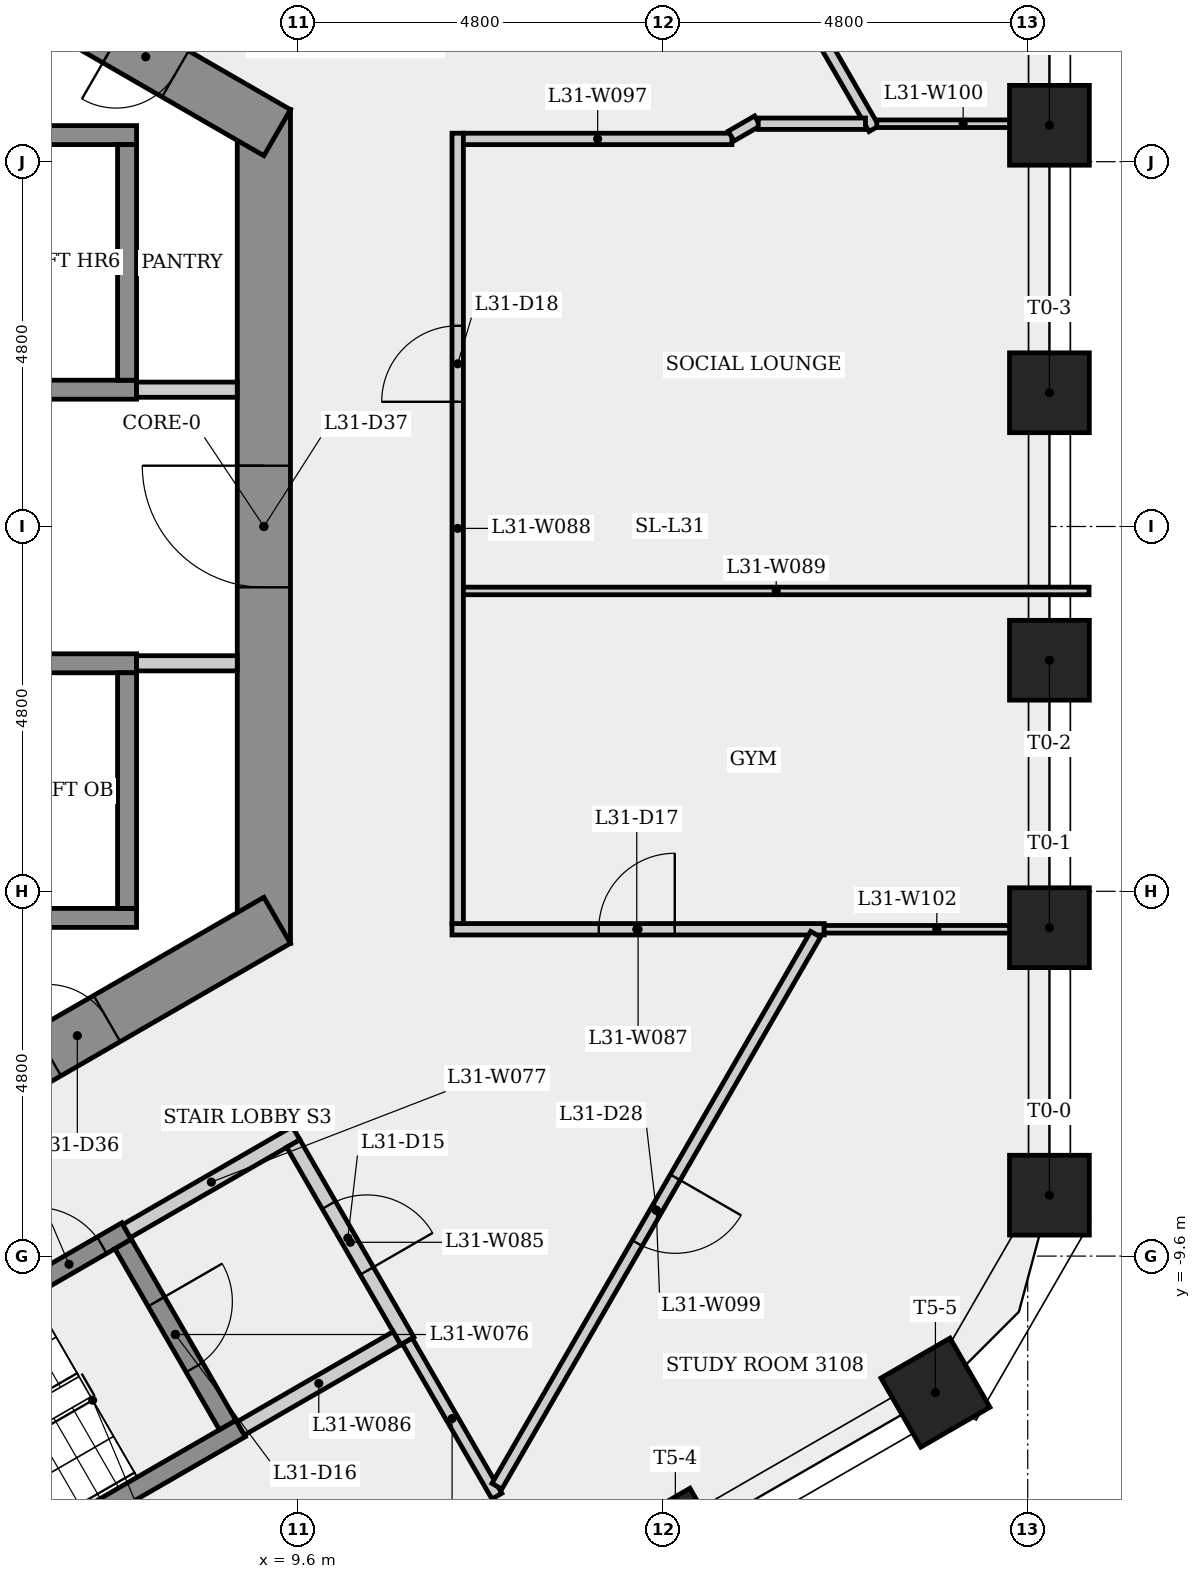
"""IFC4 building model, lengths in metres.
Left out: names, types, materials, properties, quantities, classifications, styles, units other than length and angle.
Written with IfcOpenShell. Run it as: python <this file> out.ifc"""

import sys

from ifc_helpers import new_model, si_unit, direction, frame, frame_2d, origin, origin_2d, place, context, subcontext, project, spatial, rectangle, extrude, element, fill, save


model = new_model("IFC4")
c1 = context("Model", 3, precision=1e-05, world=origin(), true_north=direction((0.0, 1.0)))
c2 = subcontext(c1, "Body", "Model", "MODEL_VIEW")
j1 = project(units=[si_unit("LENGTHUNIT", "METRE"), si_unit("PLANEANGLEUNIT", "RADIAN")], contexts=[c1])
p1 = place(None, origin())
s1 = spatial("IfcSite", under=j1, at=p1, CompositionType="ELEMENT")
p2 = place(p1, origin())
s2 = spatial("IfcBuilding", under=s1, at=p2, CompositionType="ELEMENT")
p3 = place(p2, frame((0.0, 0.0, 117.1)))
s3 = spatial("IfcBuildingStorey", under=s2, at=p3, CompositionType="ELEMENT", Elevation=117.1)
p4 = place(p3, frame((9.15, -5.485, 0.0), z_axis=(0.0, 0.0, 1.0), x_axis=(0.0, 1.0, 0.0)))
e1 = element("IfcWall", 1, at=p4, inside=s3, PredefinedType="SHEAR", context=c2, shape_type="SweptSolid", body=[
    extrude(rectangle(XDim=10.97, YDim=0.7, at=frame_2d((5.485, 0.0))), origin(), (0.0, 0.0, 1.0), 3.4),
])
p5 = place(p4, frame((4.685, 0.0, 0.0)))
e2 = element("IfcOpeningElement", 2, at=p5, cuts=e1, PredefinedType="OPENING", context=c2, shape_type="SweptSolid", body=[
    extrude(rectangle(XDim=1.6, YDim=2.1, at=frame_2d((0.8, 1.05))), frame((0.0, 0.36, 0.0), z_axis=(0.0, -1.0, 0.0), x_axis=(1.0, 0.0, 0.0)), (0.0, 0.0, 1.0), 0.72),
])
p6 = place(p3, frame((9.325, 5.182, 0.0), z_axis=(0.0, 0.0, 1.0), x_axis=(-0.866023993627, 0.500002442456, 0.0)))
e3 = element("IfcWall", 3, at=p6, inside=s3, PredefinedType="SHEAR", context=c2, shape_type="SweptSolid", body=[
    extrude(rectangle(XDim=10.97, YDim=0.7, at=frame_2d((5.485, 0.0))), origin(), (0.0, 0.0, 1.0), 3.4),
])
p7 = place(p6, frame((8.267, 0.0, 0.0)))
e4 = element("IfcOpeningElement", 4, at=p7, cuts=e3, PredefinedType="OPENING", context=c2, shape_type="SweptSolid", body=[
    extrude(rectangle(XDim=0.9, YDim=2.1, at=frame_2d((0.45, 1.05))), frame((0.0, 0.36, 0.0), z_axis=(0.0, -1.0, 0.0), x_axis=(1.0, 0.0, 0.0)), (0.0, 0.0, 1.0), 0.72),
])
p8 = place(p6, frame((1.547, 0.0, 0.0)))
e5 = element("IfcOpeningElement", 5, at=p8, cuts=e3, PredefinedType="OPENING", context=c2, shape_type="SweptSolid", body=[
    extrude(rectangle(XDim=0.9, YDim=2.1, at=frame_2d((0.45, 1.05))), frame((0.0, 0.36, 0.0), z_axis=(0.0, -1.0, 0.0), x_axis=(1.0, 0.0, 0.0)), (0.0, 0.0, 1.0), 0.72),
])
p9 = place(p3, frame((-0.175, -10.667, 0.0), z_axis=(0.0, 0.0, 1.0), x_axis=(0.866023993627, 0.500002442456, 0.0)))
e6 = element("IfcWall", 6, at=p9, inside=s3, PredefinedType="SHEAR", context=c2, shape_type="SweptSolid", body=[
    extrude(rectangle(XDim=10.97, YDim=0.7, at=frame_2d((5.485, 0.0))), origin(), (0.0, 0.0, 1.0), 3.4),
])
p10 = place(p9, frame((0.9, 0.0, 0.0)))
e7 = element("IfcOpeningElement", 7, at=p10, cuts=e6, PredefinedType="OPENING", context=c2, shape_type="SweptSolid", body=[
    extrude(rectangle(XDim=0.9, YDim=2.1, at=frame_2d((0.45, 1.05))), frame((0.0, 0.36, 0.0), z_axis=(0.0, -1.0, 0.0), x_axis=(1.0, 0.0, 0.0)), (0.0, 0.0, 1.0), 0.72),
])
p11 = place(p9, frame((7.483, 0.0, 0.0)))
e8 = element("IfcOpeningElement", 8, at=p11, cuts=e6, PredefinedType="OPENING", context=c2, shape_type="SweptSolid", body=[
    extrude(rectangle(XDim=0.9, YDim=2.1, at=frame_2d((0.45, 1.05))), frame((0.0, 0.36, 0.0), z_axis=(0.0, -1.0, 0.0), x_axis=(1.0, 0.0, 0.0)), (0.0, 0.0, 1.0), 0.72),
])
for number, where, z_axis, x_axis in (
    (9, (19.486, -8.798, 0.0), (0.0, 0.0, 1.0), (1.0, 0.0, 0.0)),
    (10, (19.486, -5.279, 0.0), (0.0, 0.0, 1.0), (1.0, 0.0, 0.0)),
    (11, (19.486, -1.76, 0.0), (0.0, 0.0, 1.0), (1.0, 0.0, 0.0)),
    (12, (19.486, 1.76, 0.0), (0.0, 0.0, 1.0), (1.0, 0.0, 0.0)),
    (13, (19.486, 5.279, 0.0), (0.0, 0.0, 1.0), (1.0, 0.0, 0.0)),
    (14, (14.564, -13.372, 0.0), (0.0, 0.0, 1.0), (0.5, -0.866, 0.0)),
    (15, (17.986, -11.396, 0.0), (0.0, 0.0, 1.0), (0.5, -0.866, 0.0)),
):
    element("IfcColumn", number, at=place(p3, frame(where, z_axis=z_axis, x_axis=x_axis)), inside=s3, PredefinedType="COLUMN", context=c2, shape_type="SweptSolid", body=[
        extrude(rectangle(XDim=1.05, YDim=1.05, at=origin_2d()), origin(), (0.0, 0.0, 1.0), 3.4),
    ])
p12 = place(p3, frame((-7.475, 1.8, 0.0), z_axis=(0.0, 0.0, 1.0), x_axis=(1.0, 0.0, 0.0)))
e16 = element("IfcWall", 16, at=p12, inside=s3, PredefinedType="SHEAR", context=c2, shape_type="SweptSolid", body=[
    extrude(rectangle(XDim=14.95, YDim=0.25, at=frame_2d((7.475, 0.0))), origin(), (0.0, 0.0, 1.0), 3.0),
])
for number, where, z_axis, x_axis in (
    (17, (-7.225, 5.15, 0.0), (0.0, 0.0, 1.0), (1.0, 0.0, 0.0)),
    (18, (-7.225, -5.15, 0.0), (0.0, 0.0, 1.0), (1.0, 0.0, 0.0)),
):
    element("IfcWall", number, at=place(p3, frame(where, z_axis=z_axis, x_axis=x_axis)), inside=s3, PredefinedType="SHEAR", context=c2, shape_type="SweptSolid", body=[
        extrude(rectangle(XDim=14.7, YDim=0.25, at=frame_2d((7.35, 0.0))), origin(), (0.0, 0.0, 1.0), 3.0),
    ])
p13 = place(p3, frame((-7.225, -1.8, 0.0), z_axis=(0.0, 0.0, 1.0), x_axis=(1.0, 0.0, 0.0)))
e19 = element("IfcWall", 19, at=p13, inside=s3, PredefinedType="SHEAR", context=c2, shape_type="SweptSolid", body=[
    extrude(rectangle(XDim=14.7, YDim=0.25, at=frame_2d((7.35, 0.0))), origin(), (0.0, 0.0, 1.0), 3.0),
])
p14 = place(p13, frame((0.597, 0.0, 0.0)))
e20 = element("IfcOpeningElement", 20, at=p14, cuts=e19, PredefinedType="OPENING", context=c2, shape_type="SweptSolid", body=[
    extrude(rectangle(XDim=1.1, YDim=2.1, at=frame_2d((0.55, 1.05))), frame((0.0, 0.135, 0.0), z_axis=(0.0, -1.0, 0.0), x_axis=(1.0, 0.0, 0.0)), (0.0, 0.0, 1.0), 0.27),
])
p15 = place(p13, frame((3.0, 0.0, 0.0)))
e21 = element("IfcOpeningElement", 21, at=p15, cuts=e19, PredefinedType="OPENING", context=c2, shape_type="SweptSolid", body=[
    extrude(rectangle(XDim=1.1, YDim=2.1, at=frame_2d((0.55, 1.05))), frame((0.0, 0.135, 0.0), z_axis=(0.0, -1.0, 0.0), x_axis=(1.0, 0.0, 0.0)), (0.0, 0.0, 1.0), 0.27),
])
p16 = place(p13, frame((5.45, 0.0, 0.0)))
e22 = element("IfcOpeningElement", 22, at=p16, cuts=e19, PredefinedType="OPENING", context=c2, shape_type="SweptSolid", body=[
    extrude(rectangle(XDim=1.1, YDim=2.1, at=frame_2d((0.55, 1.05))), frame((0.0, 0.135, 0.0), z_axis=(0.0, -1.0, 0.0), x_axis=(1.0, 0.0, 0.0)), (0.0, 0.0, 1.0), 0.27),
])
p17 = place(p13, frame((7.9, 0.0, 0.0)))
e23 = element("IfcOpeningElement", 23, at=p17, cuts=e19, PredefinedType="OPENING", context=c2, shape_type="SweptSolid", body=[
    extrude(rectangle(XDim=1.1, YDim=2.1, at=frame_2d((0.55, 1.05))), frame((0.0, 0.135, 0.0), z_axis=(0.0, -1.0, 0.0), x_axis=(1.0, 0.0, 0.0)), (0.0, 0.0, 1.0), 0.27),
])
p18 = place(p13, frame((10.35, 0.0, 0.0)))
e24 = element("IfcOpeningElement", 24, at=p18, cuts=e19, PredefinedType="OPENING", context=c2, shape_type="SweptSolid", body=[
    extrude(rectangle(XDim=1.1, YDim=2.1, at=frame_2d((0.55, 1.05))), frame((0.0, 0.135, 0.0), z_axis=(0.0, -1.0, 0.0), x_axis=(1.0, 0.0, 0.0)), (0.0, 0.0, 1.0), 0.27),
])
p19 = place(p3, frame((1.585, -12.595, 0.0), z_axis=(0.0, 0.0, 1.0), x_axis=(0.866036417653, 0.499980922934, 0.0)))
e25 = element("IfcWall", 25, at=p19, inside=s3, PredefinedType="SHEAR", context=c2, shape_type="SweptSolid", body=[
    extrude(rectangle(XDim=6.65, YDim=0.25, at=frame_2d((3.325, 0.0))), origin(), (0.0, 0.0, 1.0), 3.0),
])
p20 = place(p19, frame((5.275, 0.0, 0.0)))
e26 = element("IfcOpeningElement", 26, at=p20, cuts=e25, PredefinedType="OPENING", context=c2, shape_type="SweptSolid", body=[
    extrude(rectangle(XDim=1.0, YDim=2.1, at=frame_2d((0.5, 1.05))), frame((0.0, 0.135, 0.0), z_axis=(0.0, -1.0, 0.0), x_axis=(1.0, 0.0, 0.0)), (0.0, 0.0, 1.0), 0.27),
])
p21 = place(p3, frame((3.301, -15.068, 0.0), z_axis=(0.0, 0.0, 1.0), x_axis=(0.866035036182, 0.499983315828, 0.0)))
e27 = element("IfcWall", 27, at=p21, inside=s3, PredefinedType="SHEAR", context=c2, shape_type="SweptSolid", body=[
    extrude(rectangle(XDim=6.4, YDim=0.25, at=frame_2d((3.2, 0.0))), origin(), (0.0, 0.0, 1.0), 3.0),
])
p22 = place(p3, frame((7.298, -9.441, 0.0), z_axis=(0.0, 0.0, 1.0), x_axis=(0.500034990121, -0.866005201286, 0.0)))
e28 = element("IfcWall", 28, at=p22, inside=s3, PredefinedType="SHEAR", context=c2, shape_type="SweptSolid", body=[
    extrude(rectangle(XDim=2.75, YDim=0.25, at=frame_2d((1.375, 0.0))), origin(), (0.0, 0.0, 1.0), 3.0),
])
p23 = place(p22, frame((0.875, 0.0, 0.0)))
e29 = element("IfcOpeningElement", 29, at=p23, cuts=e28, PredefinedType="OPENING", context=c2, shape_type="SweptSolid", body=[
    extrude(rectangle(XDim=1.0, YDim=2.1, at=frame_2d((0.5, 1.05))), frame((0.0, 0.135, 0.0), z_axis=(0.0, -1.0, 0.0), x_axis=(1.0, 0.0, 0.0)), (0.0, 0.0, 1.0), 0.27),
])
p24 = place(p3, frame((7.344, -9.27, 0.0), z_axis=(0.0, 0.0, 1.0), x_axis=(0.866005588531, 0.500034319456, 0.0)))
e30 = element("IfcWall", 30, at=p24, inside=s3, PredefinedType="PARTITIONING", context=c2, shape_type="SweptSolid", body=[
    extrude(rectangle(XDim=2.575, YDim=0.2, at=frame_2d((1.288, 0.0))), origin(), (0.0, 0.0, 1.0), 3.0),
])
p25 = place(p3, frame((7.475, 1.8, 0.0), z_axis=(0.0, 0.0, 1.0), x_axis=(1.0, 0.0, 0.0)))
e31 = element("IfcWall", 31, at=p25, inside=s3, PredefinedType="PARTITIONING", context=c2, shape_type="SweptSolid", body=[
    extrude(rectangle(XDim=1.325, YDim=0.2, at=frame_2d((0.663, 0.0))), origin(), (0.0, 0.0, 1.0), 3.0),
])
for number, where, z_axis, x_axis in (
    (32, (7.35, -1.925, 0.0), (0.0, 0.0, 1.0), (0.0, -1.0, 0.0)),
    (33, (7.35, 5.025, 0.0), (0.0, 0.0, 1.0), (0.0, -1.0, 0.0)),
):
    element("IfcWall", number, at=place(p3, frame(where, z_axis=z_axis, x_axis=x_axis)), inside=s3, PredefinedType="SHEAR", context=c2, shape_type="SweptSolid", body=[
        extrude(rectangle(XDim=3.1, YDim=0.25, at=frame_2d((1.55, 0.0))), origin(), (0.0, 0.0, 1.0), 3.4),
    ])
p26 = place(p3, frame((8.8, -1.8, 0.0), z_axis=(0.0, 0.0, 1.0), x_axis=(-1.0, 0.0, 0.0)))
e34 = element("IfcWall", 34, at=p26, inside=s3, PredefinedType="PARTITIONING", context=c2, shape_type="SweptSolid", body=[
    extrude(rectangle(XDim=1.325, YDim=0.2, at=frame_2d((0.663, 0.0))), origin(), (0.0, 0.0, 1.0), 3.0),
])
p27 = place(p3, frame((9.537, -8.119, 0.0), z_axis=(0.0, 0.0, 1.0), x_axis=(0.499990139034, -0.866031096941, 0.0)))
e35 = element("IfcWall", 35, at=p27, inside=s3, PredefinedType="PARTITIONING", context=c2, shape_type="SweptSolid", body=[
    extrude(rectangle(XDim=3.0, YDim=0.2, at=frame_2d((1.5, 0.0))), origin(), (0.0, 0.0, 1.0), 3.0),
])
p28 = place(p27, frame((0.935, 0.0, 0.0)))
e36 = element("IfcOpeningElement", 36, at=p28, cuts=e35, PredefinedType="OPENING", context=c2, shape_type="SweptSolid", body=[
    extrude(rectangle(XDim=1.0, YDim=2.1, at=frame_2d((0.5, 1.05))), frame((0.0, 0.11, 0.0), z_axis=(0.0, -1.0, 0.0), x_axis=(1.0, 0.0, 0.0)), (0.0, 0.0, 1.0), 0.22),
])
p29 = place(p3, frame((10.901, -10.681, 0.0), z_axis=(0.0, 0.0, 1.0), x_axis=(-0.866007538022, -0.500030943131, 0.0)))
e37 = element("IfcWall", 37, at=p29, inside=s3, PredefinedType="PARTITIONING", context=c2, shape_type="SweptSolid", body=[
    extrude(rectangle(XDim=2.375, YDim=0.2, at=frame_2d((1.188, 0.0))), origin(), (0.0, 0.0, 1.0), 3.0),
])
p30 = place(p3, frame((11.625, -5.3, 0.0), z_axis=(0.0, 0.0, 1.0), x_axis=(1.0, 0.0, 0.0)))
e38 = element("IfcWall", 38, at=p30, inside=s3, PredefinedType="PARTITIONING", context=c2, shape_type="SweptSolid", body=[
    extrude(rectangle(XDim=4.897, YDim=0.15, at=frame_2d((2.448, 0.0))), origin(), (0.0, 0.0, 1.0), 3.0),
])
p31 = place(p30, frame((1.931, 0.0, 0.0)))
e39 = element("IfcOpeningElement", 39, at=p31, cuts=e38, PredefinedType="OPENING", context=c2, shape_type="SweptSolid", body=[
    extrude(rectangle(XDim=1.0, YDim=2.1, at=frame_2d((0.5, 1.05))), frame((0.0, 0.085, 0.0), z_axis=(0.0, -1.0, 0.0), x_axis=(1.0, 0.0, 0.0)), (0.0, 0.0, 1.0), 0.17),
])
p32 = place(p3, frame((11.7, -5.225, 0.0), z_axis=(0.0, 0.0, 1.0), x_axis=(0.0, 1.0, 0.0)))
e40 = element("IfcWall", 40, at=p32, inside=s3, PredefinedType="PARTITIONING", context=c2, shape_type="SweptSolid", body=[
    extrude(rectangle(XDim=10.399, YDim=0.15, at=frame_2d((5.2, 0.0))), origin(), (0.0, 0.0, 1.0), 3.0),
])
p33 = place(p32, frame((6.865, 0.0, 0.0)))
e41 = element("IfcOpeningElement", 41, at=p33, cuts=e40, PredefinedType="OPENING", context=c2, shape_type="SweptSolid", body=[
    extrude(rectangle(XDim=1.0, YDim=2.1, at=frame_2d((0.5, 1.05))), frame((0.0, 0.085, 0.0), z_axis=(0.0, -1.0, 0.0), x_axis=(1.0, 0.0, 0.0)), (0.0, 0.0, 1.0), 0.17),
])
p34 = place(p3, frame((11.775, -0.848, 0.0), z_axis=(0.0, 0.0, 1.0), x_axis=(1.0, 0.0, 0.0)))
e42 = element("IfcWall", 42, at=p34, inside=s3, PredefinedType="PARTITIONING", context=c2, shape_type="SweptSolid", body=[
    extrude(rectangle(XDim=8.232, YDim=0.1, at=frame_2d((4.116, 0.0))), origin(), (0.0, 0.0, 1.0), 3.0),
])
p35 = place(p3, frame((12.216, -12.758, 0.0), z_axis=(0.0, 0.0, 1.0), x_axis=(-0.499982474044, 0.866035522163, 0.0)))
e43 = element("IfcWall", 43, at=p35, inside=s3, PredefinedType="PARTITIONING", context=c2, shape_type="SweptSolid", body=[
    extrude(rectangle(XDim=2.357, YDim=0.15, at=frame_2d((1.178, 0.0))), origin(), (0.0, 0.0, 1.0), 3.0),
])
p36 = place(p3, frame((14.294, 10.228, 0.0), z_axis=(0.0, 0.0, 1.0), x_axis=(0.499996112969, -0.866027647951, 0.0)))
e44 = element("IfcWall", 44, at=p36, inside=s3, PredefinedType="PARTITIONING", context=c2, shape_type="SweptSolid", body=[
    extrude(rectangle(XDim=5.766, YDim=0.15, at=frame_2d((2.883, 0.0))), origin(), (0.0, 0.0, 1.0), 3.0),
])
p37 = place(p36, frame((2.328, 0.0, 0.0)))
e45 = element("IfcOpeningElement", 45, at=p37, cuts=e44, PredefinedType="OPENING", context=c2, shape_type="SweptSolid", body=[
    extrude(rectangle(XDim=1.0, YDim=2.1, at=frame_2d((0.5, 1.05))), frame((0.0, 0.085, 0.0), z_axis=(0.0, -1.0, 0.0), x_axis=(1.0, 0.0, 0.0)), (0.0, 0.0, 1.0), 0.17),
])
p38 = place(p3, frame((15.308, 5.1, 0.0), z_axis=(0.0, 0.0, 1.0), x_axis=(-1.0, 0.0, 0.0)))
e46 = element("IfcWall", 46, at=p38, inside=s3, PredefinedType="PARTITIONING", context=c2, shape_type="SweptSolid", body=[
    extrude(rectangle(XDim=3.533, YDim=0.15, at=frame_2d((1.767, 0.0))), origin(), (0.0, 0.0, 1.0), 3.0),
])
p39 = place(p3, frame((15.644, 5.337, 0.0), z_axis=(0.0, 0.0, 1.0), x_axis=(-0.866094119867, -0.499880961361, 0.0)))
e47 = element("IfcWall", 47, at=p39, inside=s3, PredefinedType="PARTITIONING", context=c2, shape_type="SweptSolid", body=[
    extrude(rectangle(XDim=0.4, YDim=0.15, at=frame_2d((0.2, 0.0))), origin(), (0.0, 0.0, 1.0), 3.0),
])
p40 = place(p3, frame((16.409, -5.365, 0.0), z_axis=(0.0, 0.0, 1.0), x_axis=(-0.499980296409, -0.866036779359, 0.0)))
e48 = element("IfcWall", 48, at=p40, inside=s3, PredefinedType="PARTITIONING", context=c2, shape_type="SweptSolid", body=[
    extrude(rectangle(XDim=8.387, YDim=0.15, at=frame_2d((4.194, 0.0))), origin(), (0.0, 0.0, 1.0), 3.0),
])
p41 = place(p40, frame((3.694, 0.0, 0.0)))
e49 = element("IfcOpeningElement", 49, at=p41, cuts=e48, PredefinedType="OPENING", context=c2, shape_type="SweptSolid", body=[
    extrude(rectangle(XDim=1.0, YDim=2.1, at=frame_2d((0.5, 1.05))), frame((0.0, 0.085, 0.0), z_axis=(0.0, -1.0, 0.0), x_axis=(1.0, 0.0, 0.0)), (0.0, 0.0, 1.0), 0.17),
])
p42 = place(p3, frame((17.215, 5.3, 0.0), z_axis=(0.0, 0.0, 1.0), x_axis=(1.0, 0.0, 0.0)))
e50 = element("IfcWall", 50, at=p42, inside=s3, PredefinedType="PARTITIONING", context=c2, shape_type="SweptSolid", body=[
    extrude(rectangle(XDim=2.271, YDim=0.1, at=frame_2d((1.135, 0.0))), origin(), (0.0, 0.0, 1.0), 3.0),
])
p43 = place(p3, frame((17.065, 5.3, 0.0), z_axis=(0.0, 0.0, 1.0), x_axis=(-1.0, 0.0, 0.0)))
e51 = element("IfcWall", 51, at=p43, inside=s3, PredefinedType="PARTITIONING", context=c2, shape_type="SweptSolid", body=[
    extrude(rectangle(XDim=1.41, YDim=0.15, at=frame_2d((0.705, 0.0))), origin(), (0.0, 0.0, 1.0), 3.0),
])
p44 = place(p3, frame((19.486, -5.3, 0.0), z_axis=(0.0, 0.0, 1.0), x_axis=(-1.0, 0.0, 0.0)))
e52 = element("IfcWall", 52, at=p44, inside=s3, PredefinedType="PARTITIONING", context=c2, shape_type="SweptSolid", body=[
    extrude(rectangle(XDim=2.964, YDim=0.1, at=frame_2d((1.482, 0.0))), origin(), (0.0, 0.0, 1.0), 3.0),
])
p45 = place(p20, origin())
e53 = element("IfcDoor", 53, at=p45, inside=s3, OperationType="SINGLE_SWING_LEFT", PredefinedType="DOOR", context=c2, shape_type="SweptSolid", body=[
    extrude(rectangle(XDim=1.0, YDim=2.1, at=frame_2d((0.5, 1.05))), frame((0.0, 0.025, 0.0), z_axis=(0.0, -1.0, 0.0), x_axis=(1.0, 0.0, 0.0)), (0.0, 0.0, 1.0), 0.05),
])
fill(e26, e53)
p46 = place(p28, origin())
e54 = element("IfcDoor", 54, at=p46, inside=s3, OperationType="SINGLE_SWING_RIGHT", PredefinedType="DOOR", context=c2, shape_type="SweptSolid", body=[
    extrude(rectangle(XDim=1.0, YDim=2.1, at=frame_2d((0.5, 1.05))), frame((0.0, 0.025, 0.0), z_axis=(0.0, -1.0, 0.0), x_axis=(1.0, 0.0, 0.0)), (0.0, 0.0, 1.0), 0.05),
])
fill(e36, e54)
p47 = place(p23, origin())
e55 = element("IfcDoor", 55, at=p47, inside=s3, OperationType="SINGLE_SWING_LEFT", PredefinedType="DOOR", context=c2, shape_type="SweptSolid", body=[
    extrude(rectangle(XDim=1.0, YDim=2.1, at=frame_2d((0.5, 1.05))), frame((0.0, 0.025, 0.0), z_axis=(0.0, -1.0, 0.0), x_axis=(1.0, 0.0, 0.0)), (0.0, 0.0, 1.0), 0.05),
])
fill(e29, e55)
p48 = place(p31, origin())
e56 = element("IfcDoor", 56, at=p48, inside=s3, OperationType="SINGLE_SWING_RIGHT", PredefinedType="DOOR", context=c2, shape_type="SweptSolid", body=[
    extrude(rectangle(XDim=1.0, YDim=2.1, at=frame_2d((0.5, 1.05))), frame((0.0, 0.025, 0.0), z_axis=(0.0, -1.0, 0.0), x_axis=(1.0, 0.0, 0.0)), (0.0, 0.0, 1.0), 0.05),
])
fill(e39, e56)
p49 = place(p33, origin())
e57 = element("IfcDoor", 57, at=p49, inside=s3, OperationType="SINGLE_SWING_LEFT", PredefinedType="DOOR", context=c2, shape_type="SweptSolid", body=[
    extrude(rectangle(XDim=1.0, YDim=2.1, at=frame_2d((0.5, 1.05))), frame((0.0, 0.025, 0.0), z_axis=(0.0, -1.0, 0.0), x_axis=(1.0, 0.0, 0.0)), (0.0, 0.0, 1.0), 0.05),
])
fill(e41, e57)
p50 = place(p41, origin())
e58 = element("IfcDoor", 58, at=p50, inside=s3, OperationType="SINGLE_SWING_LEFT", PredefinedType="DOOR", context=c2, shape_type="SweptSolid", body=[
    extrude(rectangle(XDim=1.0, YDim=2.1, at=frame_2d((0.5, 1.05))), frame((0.0, 0.025, 0.0), z_axis=(0.0, -1.0, 0.0), x_axis=(1.0, 0.0, 0.0)), (0.0, 0.0, 1.0), 0.05),
])
fill(e49, e58)
p51 = place(p8, origin())
e59 = element("IfcDoor", 59, at=p51, inside=s3, OperationType="SINGLE_SWING_RIGHT", PredefinedType="DOOR", context=c2, shape_type="SweptSolid", body=[
    extrude(rectangle(XDim=0.9, YDim=2.1, at=frame_2d((0.45, 1.05))), frame((0.0, 0.025, 0.0), z_axis=(0.0, -1.0, 0.0), x_axis=(1.0, 0.0, 0.0)), (0.0, 0.0, 1.0), 0.05),
])
fill(e5, e59)
p52 = place(p11, origin())
e60 = element("IfcDoor", 60, at=p52, inside=s3, OperationType="SINGLE_SWING_LEFT", PredefinedType="DOOR", context=c2, shape_type="SweptSolid", body=[
    extrude(rectangle(XDim=0.9, YDim=2.1, at=frame_2d((0.45, 1.05))), frame((0.0, 0.025, 0.0), z_axis=(0.0, -1.0, 0.0), x_axis=(1.0, 0.0, 0.0)), (0.0, 0.0, 1.0), 0.05),
])
fill(e8, e60)
p53 = place(p5, origin())
e61 = element("IfcDoor", 61, at=p53, inside=s3, OperationType="SINGLE_SWING_RIGHT", PredefinedType="DOOR", context=c2, shape_type="SweptSolid", body=[
    extrude(rectangle(XDim=1.6, YDim=2.1, at=frame_2d((0.8, 1.05))), frame((0.0, 0.025, 0.0), z_axis=(0.0, -1.0, 0.0), x_axis=(1.0, 0.0, 0.0)), (0.0, 0.0, 1.0), 0.05),
])
fill(e2, e61)
save(model, sys.argv[1])
